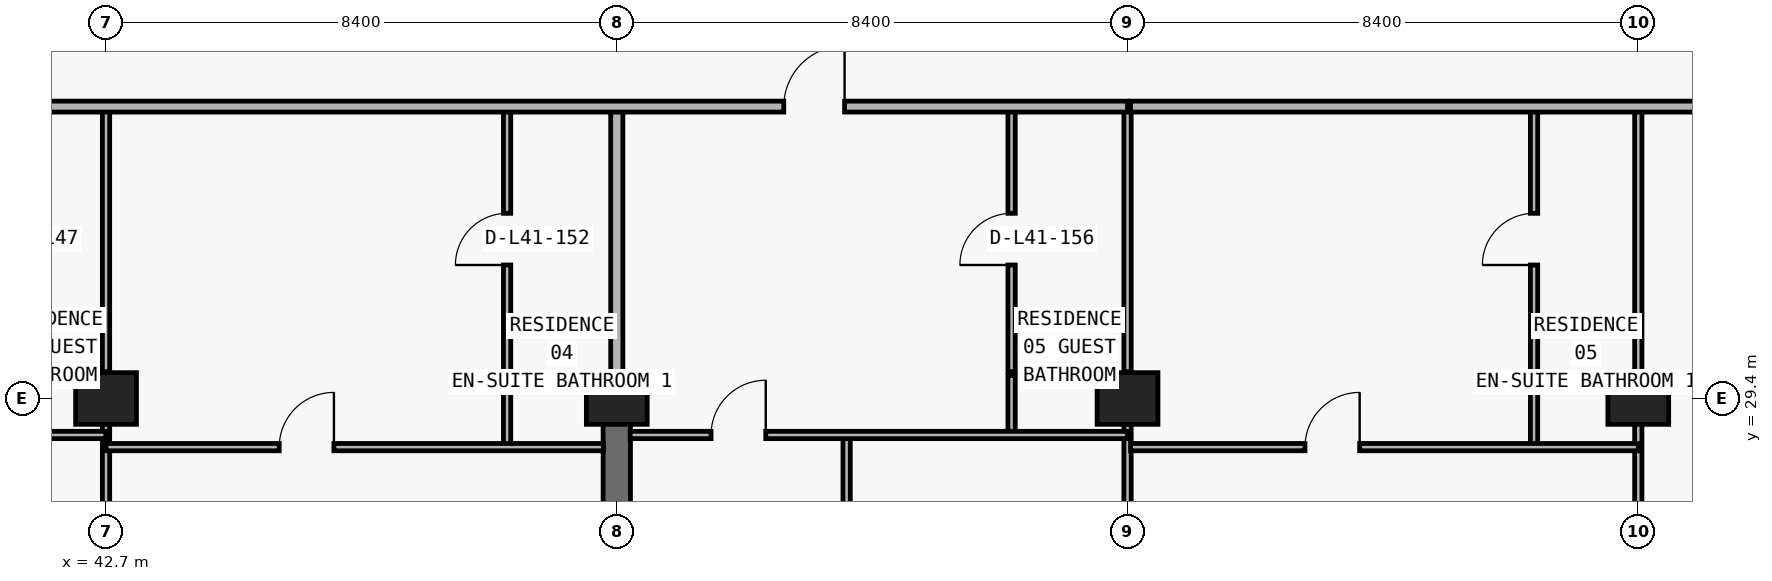
"""IFC4 building model, lengths in metres.
Left out: names, types, materials, properties, quantities, classifications, styles, units other than length and angle.
Written with IfcOpenShell. Run it as: python <this file> out.ifc"""

import sys

from ifc_helpers import new_model, si_unit, direction, frame, frame_2d, origin, origin_2d, place, context, subcontext, project, spatial, rectangle, extrude, element, fill, save


model = new_model("IFC4")
c1 = context("Model", 3, precision=1e-05, world=origin(), true_north=direction((0.0, 1.0)))
c2 = subcontext(c1, "Body", "Model", "MODEL_VIEW")
j1 = project(units=[si_unit("LENGTHUNIT", "METRE"), si_unit("PLANEANGLEUNIT", "RADIAN")], contexts=[c1])
p1 = place(None, origin())
s1 = spatial("IfcSite", under=j1, at=p1, CompositionType="ELEMENT")
p2 = place(p1, origin())
s2 = spatial("IfcBuilding", under=s1, at=p2, CompositionType="ELEMENT")
p3 = place(p2, frame((0.0, 0.0, 148.8)))
s3 = spatial("IfcBuildingStorey", under=s2, at=p3, CompositionType="ELEMENT", Elevation=148.8)
for number, where, z_axis, x_axis in (
    (1, (42.7, 29.4, 0.0), (0.0, 0.0, 1.0), (1.0, 0.0, 0.0)),
    (2, (51.1, 29.4, 0.0), (0.0, 0.0, 1.0), (1.0, 0.0, 0.0)),
    (3, (59.5, 29.4, 0.0), (0.0, 0.0, 1.0), (1.0, 0.0, 0.0)),
    (4, (67.9, 29.4, 0.0), (0.0, 0.0, 1.0), (1.0, 0.0, 0.0)),
):
    element("IfcColumn", number, at=place(p3, frame(where, z_axis=z_axis, x_axis=x_axis)), inside=s3, PredefinedType="COLUMN", context=c2, shape_type="SweptSolid", body=[
        extrude(rectangle(XDim=1.0, YDim=0.85, at=origin_2d()), origin(), (0.0, 0.0, 1.0), 3.0),
    ])
p4 = place(p3, frame((51.1, 20.8, 0.0), z_axis=(0.0, 0.0, 1.0), x_axis=(0.0, 1.0, 0.0)))
e5 = element("IfcWall", 5, at=p4, inside=s3, PredefinedType="SHEAR", context=c2, shape_type="SweptSolid", body=[
    extrude(rectangle(XDim=8.6, YDim=0.45, at=frame_2d((4.3, 0.0))), origin(), (0.0, 0.0, 1.0), 3.0),
])
p5 = place(p3, frame((42.7, 24.69, 0.0), z_axis=(0.0, 0.0, 1.0), x_axis=(0.0, 1.0, 0.0)))
e6 = element("IfcWall", 6, at=p5, inside=s3, PredefinedType="PARTITIONING", context=c2, shape_type="SweptSolid", body=[
    extrude(rectangle(XDim=5.09, YDim=0.12, at=frame_2d((2.545, 0.0))), origin(), (0.0, 0.0, 1.0), 2.124),
])
p6 = place(p5, frame((1.505, 0.0, 0.0)))
e7 = element("IfcOpeningElement", 7, at=p6, cuts=e6, PredefinedType="OPENING", context=c2, shape_type="SweptSolid", body=[
    extrude(rectangle(XDim=0.9, YDim=2.074, at=frame_2d((0.45, 1.037))), frame((0.0, 0.07, 0.0), z_axis=(0.0, -1.0, 0.0), x_axis=(1.0, 0.0, 0.0)), (0.0, 0.0, 1.0), 0.14),
])
p7 = place(p3, frame((42.7, 29.84, 0.0), z_axis=(0.0, 0.0, 1.0), x_axis=(0.0, 1.0, 0.0)))
e8 = element("IfcWall", 8, at=p7, inside=s3, PredefinedType="PARTITIONING", context=c2, shape_type="SweptSolid", body=[
    extrude(rectangle(XDim=4.36, YDim=0.12, at=frame_2d((2.18, 0.0))), origin(), (0.0, 0.0, 1.0), 2.124),
])
p8 = place(p3, frame((49.296, 28.6, 0.0), z_axis=(0.0, 0.0, 1.0), x_axis=(0.0, 1.0, 0.0)))
e9 = element("IfcWall", 9, at=p8, inside=s3, PredefinedType="PARTITIONING", context=c2, shape_type="SweptSolid", body=[
    extrude(rectangle(XDim=1.18, YDim=0.12, at=frame_2d((0.59, 0.0))), origin(), (0.0, 0.0, 1.0), 2.629),
])
p9 = place(p3, frame((49.296, 29.84, 0.0), z_axis=(0.0, 0.0, 1.0), x_axis=(0.0, 1.0, 0.0)))
e10 = element("IfcWall", 10, at=p9, inside=s3, PredefinedType="PARTITIONING", context=c2, shape_type="SweptSolid", body=[
    extrude(rectangle(XDim=4.36, YDim=0.12, at=frame_2d((2.18, 0.0))), origin(), (0.0, 0.0, 1.0), 3.0),
])
p10 = place(p9, frame((1.755, 0.0, 0.0)))
e11 = element("IfcOpeningElement", 11, at=p10, cuts=e10, PredefinedType="OPENING", context=c2, shape_type="SweptSolid", body=[
    extrude(rectangle(XDim=0.85, YDim=2.1, at=frame_2d((0.425, 1.05))), frame((0.0, 0.07, 0.0), z_axis=(0.0, -1.0, 0.0), x_axis=(1.0, 0.0, 0.0)), (0.0, 0.0, 1.0), 0.14),
])
p11 = place(p3, frame((51.1, 29.405, 0.0), z_axis=(0.0, 0.0, 1.0), x_axis=(0.0, 1.0, 0.0)))
e12 = element("IfcWall", 12, at=p11, inside=s3, PredefinedType="PARTITIONING", context=c2, shape_type="SweptSolid", body=[
    extrude(rectangle(XDim=0.375, YDim=0.2, at=frame_2d((0.188, 0.0))), origin(), (0.0, 0.0, 1.0), 3.0),
])
p12 = place(p3, frame((51.1, 29.84, 0.0), z_axis=(0.0, 0.0, 1.0), x_axis=(0.0, 1.0, 0.0)))
e13 = element("IfcWall", 13, at=p12, inside=s3, PredefinedType="PARTITIONING", context=c2, shape_type="SweptSolid", body=[
    extrude(rectangle(XDim=4.36, YDim=0.2, at=frame_2d((2.18, 0.0))), origin(), (0.0, 0.0, 1.0), 2.285),
])
p13 = place(p3, frame((54.88, 24.69, 0.0), z_axis=(0.0, 0.0, 1.0), x_axis=(0.0, 1.0, 0.0)))
e14 = element("IfcWall", 14, at=p13, inside=s3, PredefinedType="PARTITIONING", context=c2, shape_type="SweptSolid", body=[
    extrude(rectangle(XDim=4.11, YDim=0.12, at=frame_2d((2.055, 0.0))), origin(), (0.0, 0.0, 1.0), 3.0),
])
p14 = place(p13, frame((1.605, 0.0, 0.0)))
e15 = element("IfcOpeningElement", 15, at=p14, cuts=e14, PredefinedType="OPENING", context=c2, shape_type="SweptSolid", body=[
    extrude(rectangle(XDim=0.9, YDim=2.15, at=frame_2d((0.45, 1.075))), frame((0.0, 0.07, 0.0), z_axis=(0.0, -1.0, 0.0), x_axis=(1.0, 0.0, 0.0)), (0.0, 0.0, 1.0), 0.14),
])
p15 = place(p3, frame((57.593, 28.8, 0.0), z_axis=(0.0, 0.0, 1.0), x_axis=(0.0, 1.0, 0.0)))
e16 = element("IfcWall", 16, at=p15, inside=s3, PredefinedType="PARTITIONING", context=c2, shape_type="SweptSolid", body=[
    extrude(rectangle(XDim=0.98, YDim=0.12, at=frame_2d((0.49, 0.0))), origin(), (0.0, 0.0, 1.0), 2.629),
])
p16 = place(p3, frame((57.593, 29.84, 0.0), z_axis=(0.0, 0.0, 1.0), x_axis=(0.0, 1.0, 0.0)))
e17 = element("IfcWall", 17, at=p16, inside=s3, PredefinedType="PARTITIONING", context=c2, shape_type="SweptSolid", body=[
    extrude(rectangle(XDim=4.36, YDim=0.12, at=frame_2d((2.18, 0.0))), origin(), (0.0, 0.0, 1.0), 3.0),
])
p17 = place(p16, frame((1.755, 0.0, 0.0)))
e18 = element("IfcOpeningElement", 18, at=p17, cuts=e17, PredefinedType="OPENING", context=c2, shape_type="SweptSolid", body=[
    extrude(rectangle(XDim=0.85, YDim=2.1, at=frame_2d((0.425, 1.05))), frame((0.0, 0.07, 0.0), z_axis=(0.0, -1.0, 0.0), x_axis=(1.0, 0.0, 0.0)), (0.0, 0.0, 1.0), 0.14),
])
p18 = place(p3, frame((59.5, 24.69, 0.0), z_axis=(0.0, 0.0, 1.0), x_axis=(0.0, 1.0, 0.0)))
e19 = element("IfcWall", 19, at=p18, inside=s3, PredefinedType="PARTITIONING", context=c2, shape_type="SweptSolid", body=[
    extrude(rectangle(XDim=5.09, YDim=0.12, at=frame_2d((2.545, 0.0))), origin(), (0.0, 0.0, 1.0), 2.124),
])
p19 = place(p18, frame((1.505, 0.0, 0.0)))
e20 = element("IfcOpeningElement", 20, at=p19, cuts=e19, PredefinedType="OPENING", context=c2, shape_type="SweptSolid", body=[
    extrude(rectangle(XDim=0.9, YDim=2.074, at=frame_2d((0.45, 1.037))), frame((0.0, 0.07, 0.0), z_axis=(0.0, -1.0, 0.0), x_axis=(1.0, 0.0, 0.0)), (0.0, 0.0, 1.0), 0.14),
])
p20 = place(p3, frame((59.5, 29.84, 0.0), z_axis=(0.0, 0.0, 1.0), x_axis=(0.0, 1.0, 0.0)))
e21 = element("IfcWall", 21, at=p20, inside=s3, PredefinedType="PARTITIONING", context=c2, shape_type="SweptSolid", body=[
    extrude(rectangle(XDim=4.36, YDim=0.12, at=frame_2d((2.18, 0.0))), origin(), (0.0, 0.0, 1.0), 2.124),
])
p21 = place(p3, frame((66.186, 28.6, 0.0), z_axis=(0.0, 0.0, 1.0), x_axis=(0.0, 1.0, 0.0)))
e22 = element("IfcWall", 22, at=p21, inside=s3, PredefinedType="PARTITIONING", context=c2, shape_type="SweptSolid", body=[
    extrude(rectangle(XDim=1.18, YDim=0.12, at=frame_2d((0.59, 0.0))), origin(), (0.0, 0.0, 1.0), 3.0),
])
p22 = place(p3, frame((66.186, 29.84, 0.0), z_axis=(0.0, 0.0, 1.0), x_axis=(0.0, 1.0, 0.0)))
e23 = element("IfcWall", 23, at=p22, inside=s3, PredefinedType="PARTITIONING", context=c2, shape_type="SweptSolid", body=[
    extrude(rectangle(XDim=4.36, YDim=0.12, at=frame_2d((2.18, 0.0))), origin(), (0.0, 0.0, 1.0), 3.0),
])
p23 = place(p22, frame((1.755, 0.0, 0.0)))
e24 = element("IfcOpeningElement", 24, at=p23, cuts=e23, PredefinedType="OPENING", context=c2, shape_type="SweptSolid", body=[
    extrude(rectangle(XDim=0.85, YDim=2.1, at=frame_2d((0.425, 1.05))), frame((0.0, 0.07, 0.0), z_axis=(0.0, -1.0, 0.0), x_axis=(1.0, 0.0, 0.0)), (0.0, 0.0, 1.0), 0.14),
])
p24 = place(p3, frame((67.9, 24.69, 0.0), z_axis=(0.0, 0.0, 1.0), x_axis=(0.0, 1.0, 0.0)))
e25 = element("IfcWall", 25, at=p24, inside=s3, PredefinedType="PARTITIONING", context=c2, shape_type="SweptSolid", body=[
    extrude(rectangle(XDim=5.09, YDim=0.12, at=frame_2d((2.545, 0.0))), origin(), (0.0, 0.0, 1.0), 2.124),
])
p25 = place(p24, frame((1.505, 0.0, 0.0)))
e26 = element("IfcOpeningElement", 26, at=p25, cuts=e25, PredefinedType="OPENING", context=c2, shape_type="SweptSolid", body=[
    extrude(rectangle(XDim=0.9, YDim=2.074, at=frame_2d((0.45, 1.037))), frame((0.0, 0.07, 0.0), z_axis=(0.0, -1.0, 0.0), x_axis=(1.0, 0.0, 0.0)), (0.0, 0.0, 1.0), 0.14),
])
p26 = place(p3, frame((67.9, 29.84, 0.0), z_axis=(0.0, 0.0, 1.0), x_axis=(0.0, 1.0, 0.0)))
e27 = element("IfcWall", 27, at=p26, inside=s3, PredefinedType="PARTITIONING", context=c2, shape_type="SweptSolid", body=[
    extrude(rectangle(XDim=4.36, YDim=0.12, at=frame_2d((2.18, 0.0))), origin(), (0.0, 0.0, 1.0), 2.124),
])
p27 = place(p3, frame((42.7, 28.6, 0.0), z_axis=(0.0, 0.0, 1.0), x_axis=(1.0, 0.0, 0.0)))
e28 = element("IfcWall", 28, at=p27, inside=s3, PredefinedType="PARTITIONING", context=c2, shape_type="SweptSolid", body=[
    extrude(rectangle(XDim=8.18, YDim=0.12, at=frame_2d((4.09, 0.0))), origin(), (0.0, 0.0, 1.0), 3.0),
])
p28 = place(p27, frame((2.848, 0.0, 0.0)))
e29 = element("IfcOpeningElement", 29, at=p28, cuts=e28, PredefinedType="OPENING", context=c2, shape_type="SweptSolid", body=[
    extrude(rectangle(XDim=0.9, YDim=2.15, at=frame_2d((0.45, 1.075))), frame((0.0, 0.07, 0.0), z_axis=(0.0, -1.0, 0.0), x_axis=(1.0, 0.0, 0.0)), (0.0, 0.0, 1.0), 0.14),
])
p29 = place(p3, frame((59.55, 28.6, 0.0), z_axis=(0.0, 0.0, 1.0), x_axis=(1.0, 0.0, 0.0)))
e30 = element("IfcWall", 30, at=p29, inside=s3, PredefinedType="PARTITIONING", context=c2, shape_type="SweptSolid", body=[
    extrude(rectangle(XDim=8.35, YDim=0.12, at=frame_2d((4.175, 0.0))), origin(), (0.0, 0.0, 1.0), 3.0),
])
p30 = place(p29, frame((2.868, 0.0, 0.0)))
e31 = element("IfcOpeningElement", 31, at=p30, cuts=e30, PredefinedType="OPENING", context=c2, shape_type="SweptSolid", body=[
    extrude(rectangle(XDim=0.9, YDim=2.15, at=frame_2d((0.45, 1.075))), frame((0.0, 0.07, 0.0), z_axis=(0.0, -1.0, 0.0), x_axis=(1.0, 0.0, 0.0)), (0.0, 0.0, 1.0), 0.14),
])
p31 = place(p3, frame((35.1, 28.8, 0.0), z_axis=(0.0, 0.0, 1.0), x_axis=(1.0, 0.0, 0.0)))
e32 = element("IfcWall", 32, at=p31, inside=s3, PredefinedType="PARTITIONING", context=c2, shape_type="SweptSolid", body=[
    extrude(rectangle(XDim=7.595, YDim=0.12, at=frame_2d((3.797, 0.0))), origin(), (0.0, 0.0, 1.0), 3.0),
])
p32 = place(p31, frame((2.442, 0.0, 0.0)))
e33 = element("IfcOpeningElement", 33, at=p32, cuts=e32, PredefinedType="OPENING", context=c2, shape_type="SweptSolid", body=[
    extrude(rectangle(XDim=0.9, YDim=2.15, at=frame_2d((0.45, 1.075))), frame((0.0, 0.07, 0.0), z_axis=(0.0, -1.0, 0.0), x_axis=(1.0, 0.0, 0.0)), (0.0, 0.0, 1.0), 0.14),
])
p33 = place(p3, frame((51.32, 28.8, 0.0), z_axis=(0.0, 0.0, 1.0), x_axis=(1.0, 0.0, 0.0)))
e34 = element("IfcWall", 34, at=p33, inside=s3, PredefinedType="PARTITIONING", context=c2, shape_type="SweptSolid", body=[
    extrude(rectangle(XDim=8.18, YDim=0.12, at=frame_2d((4.09, 0.0))), origin(), (0.0, 0.0, 1.0), 3.0),
])
p34 = place(p33, frame((1.33, 0.0, 0.0)))
e35 = element("IfcOpeningElement", 35, at=p34, cuts=e34, PredefinedType="OPENING", context=c2, shape_type="SweptSolid", body=[
    extrude(rectangle(XDim=0.9, YDim=2.15, at=frame_2d((0.45, 1.075))), frame((0.0, 0.07, 0.0), z_axis=(0.0, -1.0, 0.0), x_axis=(1.0, 0.0, 0.0)), (0.0, 0.0, 1.0), 0.14),
])
p35 = place(p3, frame((26.7, 34.2, 0.0), z_axis=(0.0, 0.0, 1.0), x_axis=(1.0, 0.0, 0.0)))
e36 = element("IfcWall", 36, at=p35, inside=s3, PredefinedType="PARTITIONING", context=c2, shape_type="SweptSolid", body=[
    extrude(rectangle(XDim=32.8, YDim=0.18, at=frame_2d((16.4, 0.0))), origin(), (0.0, 0.0, 1.0), 3.0),
])
p36 = place(p35, frame((2.519, 0.0, 0.0)))
e37 = element("IfcOpeningElement", 37, at=p36, cuts=e36, PredefinedType="OPENING", context=c2, shape_type="SweptSolid", body=[
    extrude(rectangle(XDim=1.0, YDim=2.2, at=frame_2d((0.5, 1.1))), frame((0.0, 0.1, 0.0), z_axis=(0.0, -1.0, 0.0), x_axis=(1.0, 0.0, 0.0)), (0.0, 0.0, 1.0), 0.2),
])
p37 = place(p35, frame((10.792, 0.0, 0.0)))
e38 = element("IfcOpeningElement", 38, at=p37, cuts=e36, PredefinedType="OPENING", context=c2, shape_type="SweptSolid", body=[
    extrude(rectangle(XDim=1.0, YDim=2.2, at=frame_2d((0.5, 1.1))), frame((0.0, 0.1, 0.0), z_axis=(0.0, -1.0, 0.0), x_axis=(1.0, 0.0, 0.0)), (0.0, 0.0, 1.0), 0.2),
])
p38 = place(p35, frame((27.146, 0.0, 0.0)))
e39 = element("IfcOpeningElement", 39, at=p38, cuts=e36, PredefinedType="OPENING", context=c2, shape_type="SweptSolid", body=[
    extrude(rectangle(XDim=1.0, YDim=2.2, at=frame_2d((0.5, 1.1))), frame((0.0, 0.1, 0.0), z_axis=(0.0, -1.0, 0.0), x_axis=(1.0, 0.0, 0.0)), (0.0, 0.0, 1.0), 0.2),
])
p39 = place(p3, frame((59.55, 34.2, 0.0), z_axis=(0.0, 0.0, 1.0), x_axis=(1.0, 0.0, 0.0)))
e40 = element("IfcWall", 40, at=p39, inside=s3, PredefinedType="PARTITIONING", context=c2, shape_type="SweptSolid", body=[
    extrude(rectangle(XDim=10.55, YDim=0.18, at=frame_2d((5.275, 0.0))), origin(), (0.0, 0.0, 1.0), 3.0),
])
p40 = place(p28, origin())
e41 = element("IfcDoor", 41, at=p40, inside=s3, OperationType="SINGLE_SWING_RIGHT", PredefinedType="DOOR", context=c2, shape_type="SweptSolid", body=[
    extrude(rectangle(XDim=0.9, YDim=2.15, at=frame_2d((0.45, 1.075))), frame((0.0, 0.025, 0.0), z_axis=(0.0, -1.0, 0.0), x_axis=(1.0, 0.0, 0.0)), (0.0, 0.0, 1.0), 0.05),
])
fill(e29, e41)
p41 = place(p10, origin())
e42 = element("IfcDoor", 42, at=p41, inside=s3, OperationType="SINGLE_SWING_LEFT", PredefinedType="DOOR", context=c2, shape_type="SweptSolid", body=[
    extrude(rectangle(XDim=0.85, YDim=2.1, at=frame_2d((0.425, 1.05))), frame((0.0, 0.025, 0.0), z_axis=(0.0, -1.0, 0.0), x_axis=(1.0, 0.0, 0.0)), (0.0, 0.0, 1.0), 0.05),
])
fill(e11, e42)
p42 = place(p38, origin())
e43 = element("IfcDoor", 43, at=p42, inside=s3, OperationType="SINGLE_SWING_RIGHT", PredefinedType="DOOR", context=c2, shape_type="SweptSolid", body=[
    extrude(rectangle(XDim=1.0, YDim=2.2, at=frame_2d((0.5, 1.1))), frame((0.0, 0.025, 0.0), z_axis=(0.0, -1.0, 0.0), x_axis=(1.0, 0.0, 0.0)), (0.0, 0.0, 1.0), 0.05),
])
fill(e39, e43)
p43 = place(p17, origin())
e44 = element("IfcDoor", 44, at=p43, inside=s3, OperationType="SINGLE_SWING_LEFT", PredefinedType="DOOR", context=c2, shape_type="SweptSolid", body=[
    extrude(rectangle(XDim=0.85, YDim=2.1, at=frame_2d((0.425, 1.05))), frame((0.0, 0.025, 0.0), z_axis=(0.0, -1.0, 0.0), x_axis=(1.0, 0.0, 0.0)), (0.0, 0.0, 1.0), 0.05),
])
fill(e18, e44)
p44 = place(p34, origin())
e45 = element("IfcDoor", 45, at=p44, inside=s3, OperationType="SINGLE_SWING_RIGHT", PredefinedType="DOOR", context=c2, shape_type="SweptSolid", body=[
    extrude(rectangle(XDim=0.9, YDim=2.15, at=frame_2d((0.45, 1.075))), frame((0.0, 0.025, 0.0), z_axis=(0.0, -1.0, 0.0), x_axis=(1.0, 0.0, 0.0)), (0.0, 0.0, 1.0), 0.05),
])
fill(e35, e45)
p45 = place(p30, origin())
e46 = element("IfcDoor", 46, at=p45, inside=s3, OperationType="SINGLE_SWING_RIGHT", PredefinedType="DOOR", context=c2, shape_type="SweptSolid", body=[
    extrude(rectangle(XDim=0.9, YDim=2.15, at=frame_2d((0.45, 1.075))), frame((0.0, 0.025, 0.0), z_axis=(0.0, -1.0, 0.0), x_axis=(1.0, 0.0, 0.0)), (0.0, 0.0, 1.0), 0.05),
])
fill(e31, e46)
p46 = place(p23, origin())
e47 = element("IfcDoor", 47, at=p46, inside=s3, OperationType="SINGLE_SWING_LEFT", PredefinedType="DOOR", context=c2, shape_type="SweptSolid", body=[
    extrude(rectangle(XDim=0.85, YDim=2.1, at=frame_2d((0.425, 1.05))), frame((0.0, 0.025, 0.0), z_axis=(0.0, -1.0, 0.0), x_axis=(1.0, 0.0, 0.0)), (0.0, 0.0, 1.0), 0.05),
])
fill(e24, e47)
save(model, sys.argv[1])
